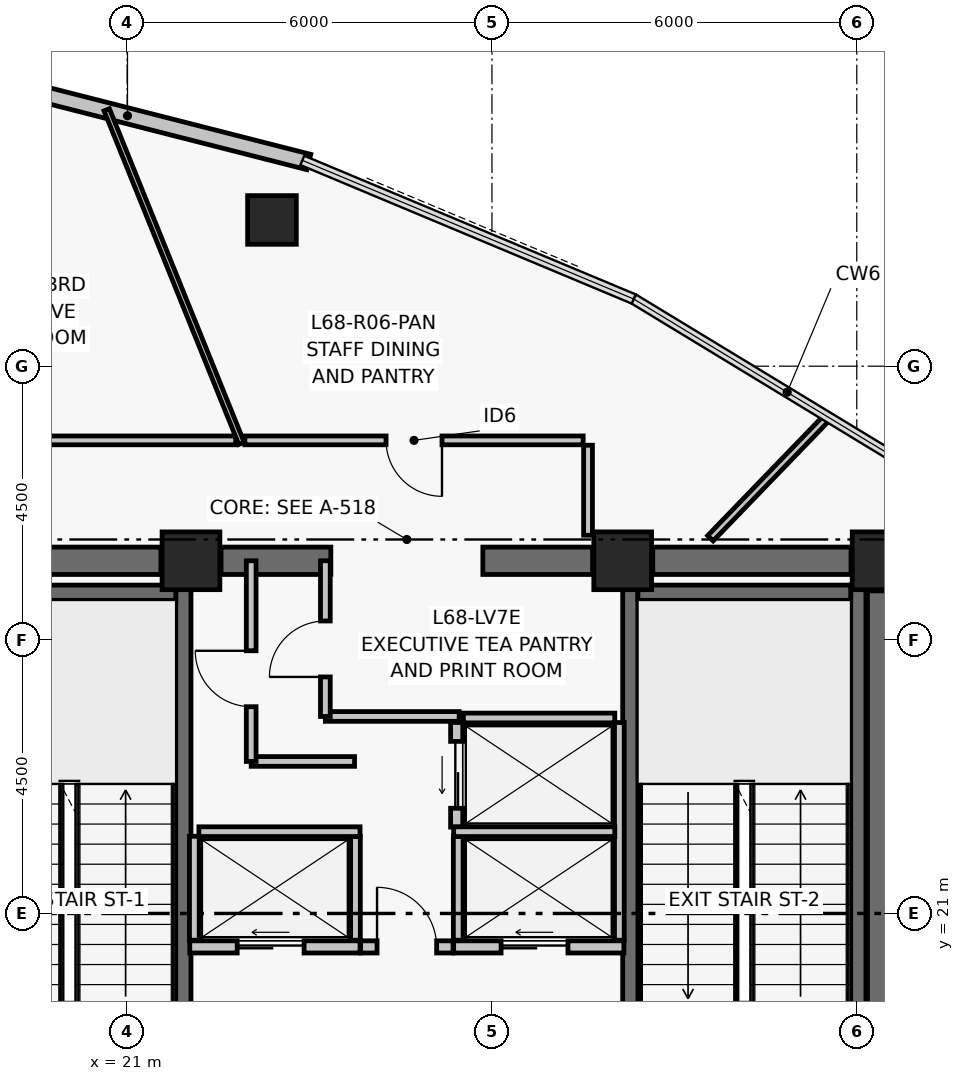
"""IFC4 building model, lengths in metres.
Left out: names, types, materials, properties, quantities, classifications, styles, units other than length and angle.
Written with IfcOpenShell. Run it as: python <this file> out.ifc"""

import sys

from ifc_helpers import new_model, si_unit, direction, frame, frame_2d, origin, origin_2d, place, context, subcontext, project, spatial, rectangle, hollow_rectangle, extrude, element, fill, save


model = new_model("IFC4")
c1 = context("Model", 3, precision=1e-05, world=origin(), true_north=direction((0.0, 1.0)))
c2 = subcontext(c1, "Body", "Model", "MODEL_VIEW")
j1 = project(units=[si_unit("LENGTHUNIT", "METRE"), si_unit("PLANEANGLEUNIT", "RADIAN")], contexts=[c1])
p1 = place(None, origin())
s1 = spatial("IfcSite", under=j1, at=p1, CompositionType="ELEMENT")
p2 = place(p1, origin())
s2 = spatial("IfcBuilding", under=s1, at=p2, CompositionType="ELEMENT")
p3 = place(p2, frame((0.0, 0.0, 269.46)))
s3 = spatial("IfcBuildingStorey", under=s2, at=p3, CompositionType="ELEMENT", Elevation=269.46)
for number, where, z_axis, x_axis in (
    (1, (22.05, 26.8, 0.0), (0.0, 0.0, 1.0), (1.0, 0.0, 0.0)),
    (2, (29.15, 26.8, 0.0), (0.0, 0.0, 1.0), (1.0, 0.0, 0.0)),
    (3, (33.4, 26.8, 0.0), (0.0, 0.0, 1.0), (1.0, 0.0, 0.0)),
):
    element("IfcColumn", number, at=place(p3, frame(where, z_axis=z_axis, x_axis=x_axis)), inside=s3, PredefinedType="COLUMN", context=c2, shape_type="SweptSolid", body=[
        extrude(rectangle(XDim=0.95, YDim=0.95, at=origin_2d()), origin(), (0.0, 0.0, 1.0), 3.72),
    ])
p4 = place(p3, frame((18.295, 26.8, 0.0), z_axis=(0.0, 0.0, 1.0), x_axis=(1.0, 0.0, 0.0)))
e4 = element("IfcWall", 4, at=p4, inside=s3, PredefinedType="SHEAR", context=c2, shape_type="SweptSolid", body=[
    extrude(rectangle(XDim=3.26, YDim=0.45, at=frame_2d((1.63, 0.0))), origin(), (0.0, 0.0, 1.0), 3.5),
])
p5 = place(p3, frame((22.545, 26.8, 0.0), z_axis=(0.0, 0.0, 1.0), x_axis=(1.0, 0.0, 0.0)))
e5 = element("IfcWall", 5, at=p5, inside=s3, PredefinedType="SHEAR", context=c2, shape_type="SweptSolid", body=[
    extrude(rectangle(XDim=1.805, YDim=0.45, at=frame_2d((0.903, 0.0))), origin(), (0.0, 0.0, 1.0), 3.5),
])
p6 = place(p3, frame((26.85, 26.8, 0.0), z_axis=(0.0, 0.0, 1.0), x_axis=(1.0, 0.0, 0.0)))
e6 = element("IfcWall", 6, at=p6, inside=s3, PredefinedType="SHEAR", context=c2, shape_type="SweptSolid", body=[
    extrude(rectangle(XDim=1.805, YDim=0.45, at=frame_2d((0.902, 0.0))), origin(), (0.0, 0.0, 1.0), 3.5),
])
p7 = place(p3, frame((29.645, 26.8, 0.0), z_axis=(0.0, 0.0, 1.0), x_axis=(1.0, 0.0, 0.0)))
e7 = element("IfcWall", 7, at=p7, inside=s3, PredefinedType="SHEAR", context=c2, shape_type="SweptSolid", body=[
    extrude(rectangle(XDim=3.26, YDim=0.45, at=frame_2d((1.63, 0.0))), origin(), (0.0, 0.0, 1.0), 3.5),
])
p8 = place(p3, frame((33.4, 17.695, 0.0), z_axis=(0.0, 0.0, 1.0), x_axis=(0.0, 1.0, 0.0)))
e8 = element("IfcWall", 8, at=p8, inside=s3, PredefinedType="SHEAR", context=c2, shape_type="SweptSolid", body=[
    extrude(rectangle(XDim=8.61, YDim=0.45, at=frame_2d((4.305, 0.0))), origin(), (0.0, 0.0, 1.0), 3.5),
])
p9 = place(p3, frame((21.925, 17.6, 0.0), z_axis=(0.0, 0.0, 1.0), x_axis=(0.0, 1.0, 0.0)))
e9 = element("IfcWall", 9, at=p9, inside=s3, PredefinedType="SHEAR", context=c2, shape_type="SweptSolid", body=[
    extrude(rectangle(XDim=8.8, YDim=0.25, at=frame_2d((4.4, 0.0))), origin(), (0.0, 0.0, 1.0), 3.5),
])
p10 = place(p9, frame((0.35, 0.0, 0.0)))
e10 = element("IfcOpeningElement", 10, at=p10, cuts=e9, PredefinedType="OPENING", context=c2, shape_type="SweptSolid", body=[
    extrude(rectangle(XDim=1.05, YDim=2.08, at=frame_2d((0.525, 1.04))), frame((0.0, 0.135, 0.0), z_axis=(0.0, -1.0, 0.0), x_axis=(1.0, 0.0, 0.0)), (0.0, 0.0, 1.0), 0.27),
])
p11 = place(p3, frame((18.3, 26.275, 0.0), z_axis=(0.0, 0.0, 1.0), x_axis=(1.0, 0.0, 0.0)))
e11 = element("IfcWall", 11, at=p11, inside=s3, PredefinedType="SHEAR", context=c2, shape_type="SweptSolid", body=[
    extrude(rectangle(XDim=3.5, YDim=0.25, at=frame_2d((1.75, 0.0))), origin(), (0.0, 0.0, 1.0), 3.5),
])
p12 = place(p3, frame((29.275, 17.6, 0.0), z_axis=(0.0, 0.0, 1.0), x_axis=(0.0, 1.0, 0.0)))
e12 = element("IfcWall", 12, at=p12, inside=s3, PredefinedType="SHEAR", context=c2, shape_type="SweptSolid", body=[
    extrude(rectangle(XDim=8.8, YDim=0.25, at=frame_2d((4.4, 0.0))), origin(), (0.0, 0.0, 1.0), 3.5),
])
p13 = place(p12, frame((0.35, 0.0, 0.0)))
e13 = element("IfcOpeningElement", 13, at=p13, cuts=e12, PredefinedType="OPENING", context=c2, shape_type="SweptSolid", body=[
    extrude(rectangle(XDim=1.05, YDim=2.08, at=frame_2d((0.525, 1.04))), frame((0.0, 0.135, 0.0), z_axis=(0.0, -1.0, 0.0), x_axis=(1.0, 0.0, 0.0)), (0.0, 0.0, 1.0), 0.27),
])
p14 = place(p3, frame((33.025, 17.6, 0.0), z_axis=(0.0, 0.0, 1.0), x_axis=(0.0, 1.0, 0.0)))
e14 = element("IfcWall", 14, at=p14, inside=s3, PredefinedType="SHEAR", context=c2, shape_type="SweptSolid", body=[
    extrude(rectangle(XDim=8.8, YDim=0.25, at=frame_2d((4.4, 0.0))), origin(), (0.0, 0.0, 1.0), 3.5),
])
p15 = place(p3, frame((29.4, 26.275, 0.0), z_axis=(0.0, 0.0, 1.0), x_axis=(1.0, 0.0, 0.0)))
e15 = element("IfcWall", 15, at=p15, inside=s3, PredefinedType="SHEAR", context=c2, shape_type="SweptSolid", body=[
    extrude(rectangle(XDim=3.5, YDim=0.25, at=frame_2d((1.75, 0.0))), origin(), (0.0, 0.0, 1.0), 3.5),
])
p16 = place(p3, frame((23.382, 32.405, 0.0), z_axis=(0.0, 0.0, 1.0), x_axis=(1.0, 0.0, 0.0)))
e16 = element("IfcColumn", 16, at=p16, inside=s3, PredefinedType="COLUMN", context=c2, shape_type="SweptSolid", body=[
    extrude(hollow_rectangle(XDim=0.8, YDim=0.8, WallThickness=0.035, at=origin_2d()), origin(), (0.0, 0.0, 1.0), 3.72),
])
p17 = place(p3, frame((18.024, 34.879, 0.0), z_axis=(0.0, 0.0, 1.0), x_axis=(0.968988278672, -0.247106689096, 0.0)))
e17 = element("IfcWall", 17, at=p17, inside=s3, PredefinedType="PARTITIONING", context=c2, shape_type="SweptSolid", body=[
    extrude(rectangle(XDim=6.154, YDim=0.26, at=frame_2d((3.077, 0.0))), origin(), (0.0, 0.0, 1.0), 3.5),
])
p18 = place(p3, frame((24.84, 20.45, 0.0), z_axis=(0.0, 0.0, 1.0), x_axis=(1.0, 0.0, 0.0)))
e18 = element("IfcWall", 18, at=p18, inside=s3, PredefinedType="PARTITIONING", context=c2, shape_type="SweptSolid", body=[
    extrude(rectangle(XDim=1.52, YDim=0.2, at=frame_2d((0.76, 0.0))), origin(), (0.0, 0.0, 1.0), 3.5),
])
p19 = place(p18, frame((0.27, 0.0, 0.0)))
e19 = element("IfcOpeningElement", 19, at=p19, cuts=e18, PredefinedType="OPENING", context=c2, shape_type="SweptSolid", body=[
    extrude(rectangle(XDim=0.98, YDim=2.06, at=frame_2d((0.49, 1.03))), frame((0.0, 0.11, 0.0), z_axis=(0.0, -1.0, 0.0), x_axis=(1.0, 0.0, 0.0)), (0.0, 0.0, 1.0), 0.22),
])
p20 = place(p3, frame((22.03, 20.45, 0.0), z_axis=(0.0, 0.0, 1.0), x_axis=(1.0, 0.0, 0.0)))
e20 = element("IfcWall", 20, at=p20, inside=s3, PredefinedType="PARTITIONING", context=c2, shape_type="SweptSolid", body=[
    extrude(rectangle(XDim=2.8, YDim=0.2, at=frame_2d((1.4, 0.0))), origin(), (0.0, 0.0, 1.0), 3.5),
])
p21 = place(p20, frame((0.78, 0.0, 0.0)))
e21 = element("IfcOpeningElement", 21, at=p21, cuts=e20, PredefinedType="OPENING", context=c2, shape_type="SweptSolid", body=[
    extrude(rectangle(XDim=1.1, YDim=2.08, at=frame_2d((0.55, 1.04))), frame((0.0, 0.11, 0.0), z_axis=(0.0, -1.0, 0.0), x_axis=(1.0, 0.0, 0.0)), (0.0, 0.0, 1.0), 0.22),
])
p22 = place(p3, frame((26.37, 20.45, 0.0), z_axis=(0.0, 0.0, 1.0), x_axis=(1.0, 0.0, 0.0)))
e22 = element("IfcWall", 22, at=p22, inside=s3, PredefinedType="PARTITIONING", context=c2, shape_type="SweptSolid", body=[
    extrude(rectangle(XDim=2.8, YDim=0.2, at=frame_2d((1.4, 0.0))), origin(), (0.0, 0.0, 1.0), 3.5),
])
p23 = place(p22, frame((0.78, 0.0, 0.0)))
e23 = element("IfcOpeningElement", 23, at=p23, cuts=e22, PredefinedType="OPENING", context=c2, shape_type="SweptSolid", body=[
    extrude(rectangle(XDim=1.1, YDim=2.08, at=frame_2d((0.55, 1.04))), frame((0.0, 0.11, 0.0), z_axis=(0.0, -1.0, 0.0), x_axis=(1.0, 0.0, 0.0)), (0.0, 0.0, 1.0), 0.22),
])
p24 = place(p3, frame((26.42, 22.42, 0.0), z_axis=(0.0, 0.0, 1.0), x_axis=(0.0, 1.0, 0.0)))
e24 = element("IfcWall", 24, at=p24, inside=s3, PredefinedType="PARTITIONING", context=c2, shape_type="SweptSolid", body=[
    extrude(rectangle(XDim=1.72, YDim=0.2, at=frame_2d((0.86, 0.0))), origin(), (0.0, 0.0, 1.0), 3.5),
])
p25 = place(p24, frame((0.31, 0.0, 0.0)))
e25 = element("IfcOpeningElement", 25, at=p25, cuts=e24, PredefinedType="OPENING", context=c2, shape_type="SweptSolid", body=[
    extrude(rectangle(XDim=1.1, YDim=2.08, at=frame_2d((0.55, 1.04))), frame((0.0, 0.11, 0.0), z_axis=(0.0, -1.0, 0.0), x_axis=(1.0, 0.0, 0.0)), (0.0, 0.0, 1.0), 0.22),
])
for number, where, z_axis, x_axis in (
    (26, (22.105, 20.56, 0.0), (0.0, 0.0, 1.0), (0.0, 1.0, 0.0)),
    (27, (24.755, 20.56, 0.0), (0.0, 0.0, 1.0), (0.0, 1.0, 0.0)),
):
    element("IfcWall", number, at=place(p3, frame(where, z_axis=z_axis, x_axis=x_axis)), inside=s3, PredefinedType="PARTITIONING", context=c2, shape_type="SweptSolid", body=[
        extrude(rectangle(XDim=1.71, YDim=0.16, at=frame_2d((0.855, 0.0))), origin(), (0.0, 0.0, 1.0), 3.5),
    ])
p26 = place(p3, frame((22.18, 22.345, 0.0), z_axis=(0.0, 0.0, 1.0), x_axis=(1.0, 0.0, 0.0)))
e28 = element("IfcWall", 28, at=p26, inside=s3, PredefinedType="PARTITIONING", context=c2, shape_type="SweptSolid", body=[
    extrude(rectangle(XDim=2.65, YDim=0.16, at=frame_2d((1.325, 0.0))), origin(), (0.0, 0.0, 1.0), 3.5),
])
p27 = place(p3, frame((29.095, 20.56, 0.0), z_axis=(0.0, 0.0, 1.0), x_axis=(0.0, 1.0, 0.0)))
e29 = element("IfcWall", 29, at=p27, inside=s3, PredefinedType="PARTITIONING", context=c2, shape_type="SweptSolid", body=[
    extrude(rectangle(XDim=3.58, YDim=0.16, at=frame_2d((1.79, 0.0))), origin(), (0.0, 0.0, 1.0), 3.5),
])
p28 = place(p3, frame((26.445, 20.56, 0.0), z_axis=(0.0, 0.0, 1.0), x_axis=(0.0, 1.0, 0.0)))
e30 = element("IfcWall", 30, at=p28, inside=s3, PredefinedType="PARTITIONING", context=c2, shape_type="SweptSolid", body=[
    extrude(rectangle(XDim=1.71, YDim=0.16, at=frame_2d((0.855, 0.0))), origin(), (0.0, 0.0, 1.0), 3.5),
])
p29 = place(p3, frame((26.37, 22.345, 0.0), z_axis=(0.0, 0.0, 1.0), x_axis=(1.0, 0.0, 0.0)))
e31 = element("IfcWall", 31, at=p29, inside=s3, PredefinedType="PARTITIONING", context=c2, shape_type="SweptSolid", body=[
    extrude(rectangle(XDim=2.65, YDim=0.16, at=frame_2d((1.325, 0.0))), origin(), (0.0, 0.0, 1.0), 3.5),
])
p30 = place(p3, frame((26.53, 24.215, 0.0), z_axis=(0.0, 0.0, 1.0), x_axis=(1.0, 0.0, 0.0)))
e32 = element("IfcWall", 32, at=p30, inside=s3, PredefinedType="PARTITIONING", context=c2, shape_type="SweptSolid", body=[
    extrude(rectangle(XDim=2.49, YDim=0.16, at=frame_2d((1.245, 0.0))), origin(), (0.0, 0.0, 1.0), 3.5),
])
p31 = place(p3, frame((23.04, 23.5, 0.0), z_axis=(0.0, 0.0, 1.0), x_axis=(1.0, 0.0, 0.0)))
e33 = element("IfcWall", 33, at=p31, inside=s3, PredefinedType="PARTITIONING", context=c2, shape_type="SweptSolid", body=[
    extrude(rectangle(XDim=1.7, YDim=0.16, at=frame_2d((0.85, 0.0))), origin(), (0.0, 0.0, 1.0), 3.5),
])
p32 = place(p3, frame((23.04, 23.5, 0.0), z_axis=(0.0, 0.0, 1.0), x_axis=(0.0, 1.0, 0.0)))
e34 = element("IfcWall", 34, at=p32, inside=s3, PredefinedType="PARTITIONING", context=c2, shape_type="SweptSolid", body=[
    extrude(rectangle(XDim=3.3, YDim=0.16, at=frame_2d((1.65, 0.0))), origin(), (0.0, 0.0, 1.0), 2.63),
])
p33 = place(p32, frame((0.9, 0.0, 0.0)))
e35 = element("IfcOpeningElement", 35, at=p33, cuts=e34, PredefinedType="OPENING", context=c2, shape_type="SweptSolid", body=[
    extrude(rectangle(XDim=0.92, YDim=2.05, at=frame_2d((0.46, 1.025))), frame((0.0, 0.09, 0.0), z_axis=(0.0, -1.0, 0.0), x_axis=(1.0, 0.0, 0.0)), (0.0, 0.0, 1.0), 0.18),
])
p34 = place(p3, frame((24.26, 24.24, 0.0), z_axis=(0.0, 0.0, 1.0), x_axis=(1.0, 0.0, 0.0)))
e36 = element("IfcWall", 36, at=p34, inside=s3, PredefinedType="PARTITIONING", context=c2, shape_type="SweptSolid", body=[
    extrude(rectangle(XDim=2.2, YDim=0.16, at=frame_2d((1.1, 0.0))), origin(), (0.0, 0.0, 1.0), 3.5),
])
p35 = place(p3, frame((24.26, 24.24, 0.0), z_axis=(0.0, 0.0, 1.0), x_axis=(0.0, 1.0, 0.0)))
e37 = element("IfcWall", 37, at=p35, inside=s3, PredefinedType="PARTITIONING", context=c2, shape_type="SweptSolid", body=[
    extrude(rectangle(XDim=2.56, YDim=0.16, at=frame_2d((1.28, 0.0))), origin(), (0.0, 0.0, 1.0), 2.63),
])
p36 = place(p35, frame((0.65, 0.0, 0.0)))
e38 = element("IfcOpeningElement", 38, at=p36, cuts=e37, PredefinedType="OPENING", context=c2, shape_type="SweptSolid", body=[
    extrude(rectangle(XDim=0.92, YDim=2.05, at=frame_2d((0.46, 1.025))), frame((0.0, 0.09, 0.0), z_axis=(0.0, -1.0, 0.0), x_axis=(1.0, 0.0, 0.0)), (0.0, 0.0, 1.0), 0.18),
])
p37 = place(p3, frame((28.58, 27.22, 0.0), z_axis=(0.0, 0.0, 1.0), x_axis=(0.0, 1.0, 0.0)))
e39 = element("IfcWall", 39, at=p37, inside=s3, PredefinedType="PARTITIONING", context=c2, shape_type="SweptSolid", body=[
    extrude(rectangle(XDim=1.48, YDim=0.145, at=frame_2d((0.74, 0.0))), origin(), (0.0, 0.0, 1.0), 2.63),
])
p38 = place(p3, frame((28.5, 28.78, 0.0), z_axis=(0.0, 0.0, 1.0), x_axis=(-1.0, 0.0, 0.0)))
e40 = element("IfcWall", 40, at=p38, inside=s3, PredefinedType="PARTITIONING", context=c2, shape_type="SweptSolid", body=[
    extrude(rectangle(XDim=5.564, YDim=0.145, at=frame_2d((2.782, 0.0))), origin(), (0.0, 0.0, 1.0), 3.5),
])
p39 = place(p38, frame((2.322, 0.0, 0.0)))
e41 = element("IfcOpeningElement", 41, at=p39, cuts=e40, PredefinedType="OPENING", context=c2, shape_type="SweptSolid", body=[
    extrude(rectangle(XDim=0.92, YDim=2.05, at=frame_2d((0.46, 1.025))), frame((0.0, 0.083, 0.0), z_axis=(0.0, -1.0, 0.0), x_axis=(1.0, 0.0, 0.0)), (0.0, 0.0, 1.0), 0.165),
])
p40 = place(p3, frame((22.785, 28.78, 0.0), z_axis=(0.0, 0.0, 1.0), x_axis=(-1.0, 0.0, 0.0)))
e42 = element("IfcWall", 42, at=p40, inside=s3, PredefinedType="PARTITIONING", context=c2, shape_type="SweptSolid", body=[
    extrude(rectangle(XDim=5.245, YDim=0.145, at=frame_2d((2.623, 0.0))), origin(), (0.0, 0.0, 1.0), 2.78),
])
p41 = place(p3, frame((30.593, 27.17, 0.0), z_axis=(0.0, 0.0, 1.0), x_axis=(0.694647663232, 0.719350140033, 0.0)))
e43 = element("IfcWall", 43, at=p41, inside=s3, PredefinedType="PARTITIONING", context=c2, shape_type="SweptSolid", body=[
    extrude(rectangle(XDim=2.787, YDim=0.125, at=frame_2d((1.394, 0.0))), origin(), (0.0, 0.0, 1.0), 2.63),
])
p42 = place(p3, frame((22.881, 28.73, 0.0), z_axis=(0.0, 0.0, 1.0), x_axis=(-0.374589946081, 0.927190580353, 0.0)))
e44 = element("IfcWall", 44, at=p42, inside=s3, PredefinedType="PARTITIONING", context=c2, shape_type="SweptSolid", body=[
    extrude(rectangle(XDim=5.917, YDim=0.095, at=frame_2d((2.958, 0.0))), origin(), (0.0, 0.0, 1.0), 2.78),
])
p43 = place(p19, origin())
e45 = element("IfcDoor", 45, at=p43, inside=s3, OperationType="SINGLE_SWING_LEFT", PredefinedType="DOOR", context=c2, shape_type="SweptSolid", body=[
    extrude(rectangle(XDim=0.98, YDim=2.06, at=frame_2d((0.49, 1.03))), frame((0.0, 0.025, 0.0), z_axis=(0.0, -1.0, 0.0), x_axis=(1.0, 0.0, 0.0)), (0.0, 0.0, 1.0), 0.05),
])
fill(e19, e45)
p44 = place(p21, origin())
e46 = element("IfcDoor", 46, at=p44, inside=s3, OperationType="DOUBLE_DOOR_SLIDING", PredefinedType="DOOR", context=c2, shape_type="SweptSolid", body=[
    extrude(rectangle(XDim=1.1, YDim=2.08, at=frame_2d((0.55, 1.04))), frame((0.0, 0.025, 0.0), z_axis=(0.0, -1.0, 0.0), x_axis=(1.0, 0.0, 0.0)), (0.0, 0.0, 1.0), 0.05),
])
fill(e21, e46)
p45 = place(p23, origin())
e47 = element("IfcDoor", 47, at=p45, inside=s3, OperationType="DOUBLE_DOOR_SLIDING", PredefinedType="DOOR", context=c2, shape_type="SweptSolid", body=[
    extrude(rectangle(XDim=1.1, YDim=2.08, at=frame_2d((0.55, 1.04))), frame((0.0, 0.025, 0.0), z_axis=(0.0, -1.0, 0.0), x_axis=(1.0, 0.0, 0.0)), (0.0, 0.0, 1.0), 0.05),
])
fill(e23, e47)
p46 = place(p25, origin())
e48 = element("IfcDoor", 48, at=p46, inside=s3, OperationType="DOUBLE_DOOR_SLIDING", PredefinedType="DOOR", context=c2, shape_type="SweptSolid", body=[
    extrude(rectangle(XDim=1.1, YDim=2.08, at=frame_2d((0.55, 1.04))), frame((0.0, 0.025, 0.0), z_axis=(0.0, -1.0, 0.0), x_axis=(1.0, 0.0, 0.0)), (0.0, 0.0, 1.0), 0.05),
])
fill(e25, e48)
p47 = place(p33, origin())
e49 = element("IfcDoor", 49, at=p47, inside=s3, OperationType="SINGLE_SWING_RIGHT", PredefinedType="DOOR", context=c2, shape_type="SweptSolid", body=[
    extrude(rectangle(XDim=0.92, YDim=2.05, at=frame_2d((0.46, 1.025))), frame((0.0, 0.025, 0.0), z_axis=(0.0, -1.0, 0.0), x_axis=(1.0, 0.0, 0.0)), (0.0, 0.0, 1.0), 0.05),
])
fill(e35, e49)
p48 = place(p36, origin())
e50 = element("IfcDoor", 50, at=p48, inside=s3, OperationType="SINGLE_SWING_LEFT", PredefinedType="DOOR", context=c2, shape_type="SweptSolid", body=[
    extrude(rectangle(XDim=0.92, YDim=2.05, at=frame_2d((0.46, 1.025))), frame((0.0, 0.025, 0.0), z_axis=(0.0, -1.0, 0.0), x_axis=(1.0, 0.0, 0.0)), (0.0, 0.0, 1.0), 0.05),
])
fill(e38, e50)
p49 = place(p39, origin())
e51 = element("IfcDoor", 51, at=p49, inside=s3, OperationType="SINGLE_SWING_LEFT", PredefinedType="DOOR", context=c2, shape_type="SweptSolid", body=[
    extrude(rectangle(XDim=0.92, YDim=2.05, at=frame_2d((0.46, 1.025))), frame((0.0, 0.025, 0.0), z_axis=(0.0, -1.0, 0.0), x_axis=(1.0, 0.0, 0.0)), (0.0, 0.0, 1.0), 0.05),
])
fill(e41, e51)
save(model, sys.argv[1])
